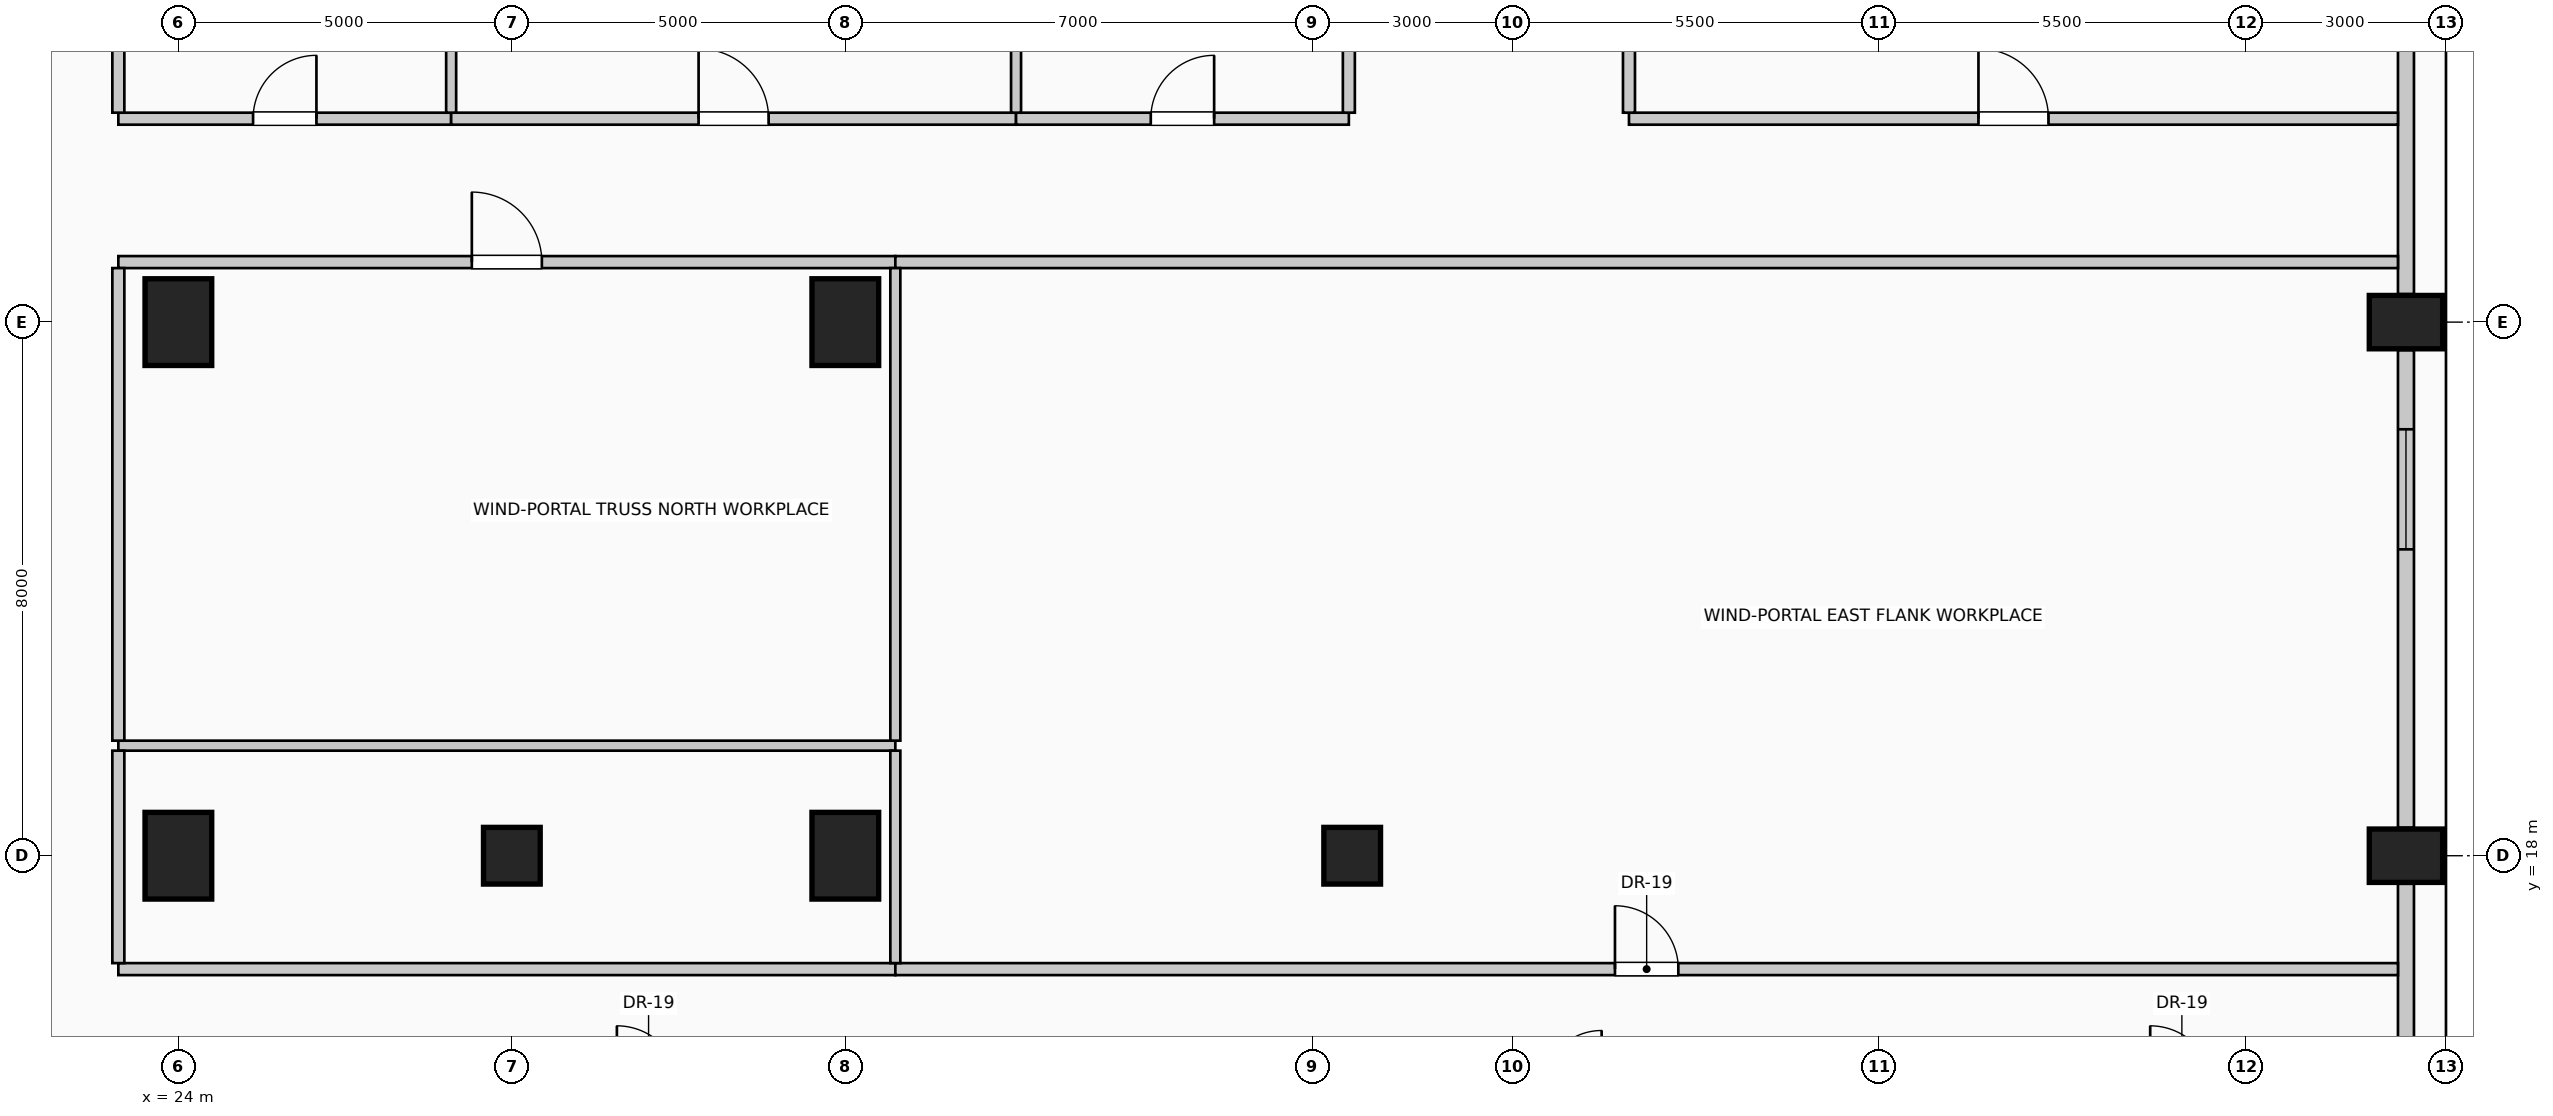
"""IFC4 building model, lengths in metres.
Left out: names, types, materials, properties, quantities, classifications, styles, units other than length and angle.
Written with IfcOpenShell. Run it as: python <this file> out.ifc"""

import sys

from ifc_helpers import new_model, si_unit, direction, frame, frame_2d, origin, origin_2d, place, context, subcontext, project, spatial, rectangle, circle, extrude, element, fill, save


model = new_model("IFC4")
c1 = context("Model", 3, precision=1e-05, world=origin(), true_north=direction((0.0, 1.0)))
c2 = subcontext(c1, "Body", "Model", "MODEL_VIEW")
j1 = project(units=[si_unit("LENGTHUNIT", "METRE"), si_unit("PLANEANGLEUNIT", "RADIAN")], contexts=[c1])
p1 = place(None, origin())
s1 = spatial("IfcSite", under=j1, at=p1, CompositionType="ELEMENT")
p2 = place(p1, origin())
s2 = spatial("IfcBuilding", under=s1, at=p2, CompositionType="ELEMENT")
p3 = place(p2, frame((0.0, 0.0, 214.6)))
s3 = spatial("IfcBuildingStorey", under=s2, at=p3, CompositionType="ELEMENT", Elevation=214.6)
for number, where, z_axis, x_axis in (
    (1, (57.4, 18.0, 0.0), (0.0, 0.0, 1.0), (0.0, 1.0, 0.0)),
    (2, (57.4, 26.0, 0.0), (0.0, 0.0, 1.0), (0.0, 1.0, 0.0)),
):
    element("IfcColumn", number, at=place(p3, frame(where, z_axis=z_axis, x_axis=x_axis)), inside=s3, PredefinedType="COLUMN", context=c2, shape_type="SweptSolid", body=[
        extrude(rectangle(XDim=0.8, YDim=1.1, at=origin_2d()), origin(), (0.0, 0.0, 1.0), 4.0),
    ])
for number, where, z_axis, x_axis in (
    (3, (24.0, 18.0, 0.0), (0.0, 0.0, 1.0), (1.0, 0.0, 0.0)),
    (4, (34.0, 18.0, 0.0), (0.0, 0.0, 1.0), (1.0, 0.0, 0.0)),
    (5, (24.0, 26.0, 0.0), (0.0, 0.0, 1.0), (1.0, 0.0, 0.0)),
    (6, (34.0, 26.0, 0.0), (0.0, 0.0, 1.0), (1.0, 0.0, 0.0)),
):
    element("IfcColumn", number, at=place(p3, frame(where, z_axis=z_axis, x_axis=x_axis)), inside=s3, PredefinedType="COLUMN", context=c2, shape_type="SweptSolid", body=[
        extrude(rectangle(XDim=1.0, YDim=1.3, at=origin_2d()), origin(), (0.0, 0.0, 1.0), 4.0),
    ])
for number, where, z_axis, x_axis in (
    (7, (29.0, 18.0, 0.0), (0.0, 0.0, 1.0), (1.0, 0.0, 0.0)),
    (8, (41.6, 18.0, 0.0), (0.0, 0.0, 1.0), (1.0, 0.0, 0.0)),
):
    element("IfcColumn", number, at=place(p3, frame(where, z_axis=z_axis, x_axis=x_axis)), inside=s3, PredefinedType="COLUMN", context=c2, shape_type="SweptSolid", body=[
        extrude(circle(Radius=0.425, at=origin_2d()), origin(), (0.0, 0.0, 1.0), 4.0),
    ])
p4 = place(p3, frame((57.4, 17.58, 0.0), z_axis=(0.0, 0.0, 1.0), x_axis=(0.0, -1.0, 0.0)))
e9 = element("IfcWall", 9, at=p4, inside=s3, PredefinedType="SOLIDWALL", context=c2, shape_type="SweptSolid", body=[
    extrude(rectangle(XDim=7.16, YDim=0.24, at=frame_2d((3.58, 0.0))), origin(), (0.0, 0.0, 1.0), 3.0),
])
p5 = place(p4, frame((4.173, 0.0, 0.42)))
e10 = element("IfcOpeningElement", 10, at=p5, cuts=e9, PredefinedType="OPENING", context=c2, shape_type="SweptSolid", body=[
    extrude(rectangle(XDim=1.8, YDim=2.2, at=frame_2d((0.9, 1.1))), frame((0.0, 0.13, 0.0), z_axis=(0.0, -1.0, 0.0), x_axis=(1.0, 0.0, 0.0)), (0.0, 0.0, 1.0), 0.26),
])
p6 = place(p3, frame((57.4, 25.58, 0.0), z_axis=(0.0, 0.0, 1.0), x_axis=(0.0, -1.0, 0.0)))
e11 = element("IfcWall", 11, at=p6, inside=s3, PredefinedType="SOLIDWALL", context=c2, shape_type="SweptSolid", body=[
    extrude(rectangle(XDim=7.16, YDim=0.24, at=frame_2d((3.58, 0.0))), origin(), (0.0, 0.0, 1.0), 3.0),
])
p7 = place(p6, frame((1.187, 0.0, 0.42)))
e12 = element("IfcOpeningElement", 12, at=p7, cuts=e11, PredefinedType="OPENING", context=c2, shape_type="SweptSolid", body=[
    extrude(rectangle(XDim=1.8, YDim=2.2, at=frame_2d((0.9, 1.1))), frame((0.0, 0.13, 0.0), z_axis=(0.0, -1.0, 0.0), x_axis=(1.0, 0.0, 0.0)), (0.0, 0.0, 1.0), 0.26),
])
p8 = place(p3, frame((57.4, 33.58, 0.0), z_axis=(0.0, 0.0, 1.0), x_axis=(0.0, -1.0, 0.0)))
e13 = element("IfcWall", 13, at=p8, inside=s3, PredefinedType="SOLIDWALL", context=c2, shape_type="SweptSolid", body=[
    extrude(rectangle(XDim=7.16, YDim=0.24, at=frame_2d((3.58, 0.0))), origin(), (0.0, 0.0, 1.0), 3.0),
])
p9 = place(p3, frame((23.1, 16.3, 0.0), z_axis=(0.0, 0.0, 1.0), x_axis=(1.0, 0.0, 0.0)))
e14 = element("IfcWall", 14, at=p9, inside=s3, PredefinedType="PARTITIONING", context=c2, shape_type="SweptSolid", body=[
    extrude(rectangle(XDim=11.65, YDim=0.18, at=frame_2d((5.825, 0.0))), origin(), (0.0, 0.0, 1.0), 3.75),
])
p10 = place(p3, frame((34.75, 16.3, 0.0), z_axis=(0.0, 0.0, 1.0), x_axis=(1.0, 0.0, 0.0)))
e15 = element("IfcWall", 15, at=p10, inside=s3, PredefinedType="PARTITIONING", context=c2, shape_type="SweptSolid", body=[
    extrude(rectangle(XDim=22.53, YDim=0.18, at=frame_2d((11.265, 0.0))), origin(), (0.0, 0.0, 1.0), 3.75),
])
p11 = place(p10, frame((10.79, 0.0, 0.0)))
e16 = element("IfcOpeningElement", 16, at=p11, cuts=e15, PredefinedType="OPENING", context=c2, shape_type="SweptSolid", body=[
    extrude(rectangle(XDim=0.95, YDim=2.15, at=frame_2d((0.475, 1.075))), frame((0.0, 0.1, 0.0), z_axis=(0.0, -1.0, 0.0), x_axis=(1.0, 0.0, 0.0)), (0.0, 0.0, 1.0), 0.2),
])
p12 = place(p3, frame((23.1, 19.65, 0.0), z_axis=(0.0, 0.0, 1.0), x_axis=(1.0, 0.0, 0.0)))
e17 = element("IfcWall", 17, at=p12, inside=s3, PredefinedType="PARTITIONING", context=c2, shape_type="SweptSolid", body=[
    extrude(rectangle(XDim=11.65, YDim=0.15, at=frame_2d((5.825, 0.0))), origin(), (0.0, 0.0, 1.0), 3.75),
])
p13 = place(p3, frame((23.1, 26.9, 0.0), z_axis=(0.0, 0.0, 1.0), x_axis=(1.0, 0.0, 0.0)))
e18 = element("IfcWall", 18, at=p13, inside=s3, PredefinedType="PARTITIONING", context=c2, shape_type="SweptSolid", body=[
    extrude(rectangle(XDim=11.65, YDim=0.18, at=frame_2d((5.825, 0.0))), origin(), (0.0, 0.0, 1.0), 3.75),
])
p14 = place(p13, frame((5.3, 0.0, 0.0)))
e19 = element("IfcOpeningElement", 19, at=p14, cuts=e18, PredefinedType="OPENING", context=c2, shape_type="SweptSolid", body=[
    extrude(rectangle(XDim=1.05, YDim=2.15, at=frame_2d((0.525, 1.075))), frame((0.0, 0.1, 0.0), z_axis=(0.0, -1.0, 0.0), x_axis=(1.0, 0.0, 0.0)), (0.0, 0.0, 1.0), 0.2),
])
p15 = place(p3, frame((34.75, 26.9, 0.0), z_axis=(0.0, 0.0, 1.0), x_axis=(1.0, 0.0, 0.0)))
e20 = element("IfcWall", 20, at=p15, inside=s3, PredefinedType="PARTITIONING", context=c2, shape_type="SweptSolid", body=[
    extrude(rectangle(XDim=22.53, YDim=0.18, at=frame_2d((11.265, 0.0))), origin(), (0.0, 0.0, 1.0), 3.75),
])
p16 = place(p3, frame((23.1, 29.05, 0.0), z_axis=(0.0, 0.0, 1.0), x_axis=(1.0, 0.0, 0.0)))
e21 = element("IfcWall", 21, at=p16, inside=s3, PredefinedType="PARTITIONING", context=c2, shape_type="SweptSolid", body=[
    extrude(rectangle(XDim=4.99, YDim=0.18, at=frame_2d((2.495, 0.0))), origin(), (0.0, 0.0, 1.0), 3.75),
])
p17 = place(p16, frame((2.02, 0.0, 0.0)))
e22 = element("IfcOpeningElement", 22, at=p17, cuts=e21, PredefinedType="OPENING", context=c2, shape_type="SweptSolid", body=[
    extrude(rectangle(XDim=0.95, YDim=2.15, at=frame_2d((0.475, 1.075))), frame((0.0, 0.1, 0.0), z_axis=(0.0, -1.0, 0.0), x_axis=(1.0, 0.0, 0.0)), (0.0, 0.0, 1.0), 0.2),
])
p18 = place(p3, frame((28.09, 29.05, 0.0), z_axis=(0.0, 0.0, 1.0), x_axis=(1.0, 0.0, 0.0)))
e23 = element("IfcWall", 23, at=p18, inside=s3, PredefinedType="PARTITIONING", context=c2, shape_type="SweptSolid", body=[
    extrude(rectangle(XDim=8.47, YDim=0.18, at=frame_2d((4.235, 0.0))), origin(), (0.0, 0.0, 1.0), 3.75),
])
p19 = place(p18, frame((3.71, 0.0, 0.0)))
e24 = element("IfcOpeningElement", 24, at=p19, cuts=e23, PredefinedType="OPENING", context=c2, shape_type="SweptSolid", body=[
    extrude(rectangle(XDim=1.05, YDim=2.15, at=frame_2d((0.525, 1.075))), frame((0.0, 0.1, 0.0), z_axis=(0.0, -1.0, 0.0), x_axis=(1.0, 0.0, 0.0)), (0.0, 0.0, 1.0), 0.2),
])
p20 = place(p3, frame((36.56, 29.05, 0.0), z_axis=(0.0, 0.0, 1.0), x_axis=(1.0, 0.0, 0.0)))
e25 = element("IfcWall", 25, at=p20, inside=s3, PredefinedType="PARTITIONING", context=c2, shape_type="SweptSolid", body=[
    extrude(rectangle(XDim=4.99, YDim=0.18, at=frame_2d((2.495, 0.0))), origin(), (0.0, 0.0, 1.0), 3.75),
])
p21 = place(p20, frame((2.02, 0.0, 0.0)))
e26 = element("IfcOpeningElement", 26, at=p21, cuts=e25, PredefinedType="OPENING", context=c2, shape_type="SweptSolid", body=[
    extrude(rectangle(XDim=0.95, YDim=2.15, at=frame_2d((0.475, 1.075))), frame((0.0, 0.1, 0.0), z_axis=(0.0, -1.0, 0.0), x_axis=(1.0, 0.0, 0.0)), (0.0, 0.0, 1.0), 0.2),
])
p22 = place(p3, frame((45.75, 29.05, 0.0), z_axis=(0.0, 0.0, 1.0), x_axis=(1.0, 0.0, 0.0)))
e27 = element("IfcWall", 27, at=p22, inside=s3, PredefinedType="PARTITIONING", context=c2, shape_type="SweptSolid", body=[
    extrude(rectangle(XDim=11.53, YDim=0.18, at=frame_2d((5.765, 0.0))), origin(), (0.0, 0.0, 1.0), 3.75),
])
p23 = place(p22, frame((5.24, 0.0, 0.0)))
e28 = element("IfcOpeningElement", 28, at=p23, cuts=e27, PredefinedType="OPENING", context=c2, shape_type="SweptSolid", body=[
    extrude(rectangle(XDim=1.05, YDim=2.15, at=frame_2d((0.525, 1.075))), frame((0.0, 0.1, 0.0), z_axis=(0.0, -1.0, 0.0), x_axis=(1.0, 0.0, 0.0)), (0.0, 0.0, 1.0), 0.2),
])
p24 = place(p3, frame((23.1, 16.39, 0.0), z_axis=(0.0, 0.0, 1.0), x_axis=(0.0, 1.0, 0.0)))
e29 = element("IfcWall", 29, at=p24, inside=s3, PredefinedType="PARTITIONING", context=c2, shape_type="SweptSolid", body=[
    extrude(rectangle(XDim=3.185, YDim=0.18, at=frame_2d((1.593, 0.0))), origin(), (0.0, 0.0, 1.0), 3.75),
])
p25 = place(p3, frame((23.1, 19.725, 0.0), z_axis=(0.0, 0.0, 1.0), x_axis=(0.0, 1.0, 0.0)))
e30 = element("IfcWall", 30, at=p25, inside=s3, PredefinedType="PARTITIONING", context=c2, shape_type="SweptSolid", body=[
    extrude(rectangle(XDim=7.085, YDim=0.18, at=frame_2d((3.542, 0.0))), origin(), (0.0, 0.0, 1.0), 3.75),
])
p26 = place(p3, frame((23.1, 29.14, 0.0), z_axis=(0.0, 0.0, 1.0), x_axis=(0.0, 1.0, 0.0)))
e31 = element("IfcWall", 31, at=p26, inside=s3, PredefinedType="PARTITIONING", context=c2, shape_type="SweptSolid", body=[
    extrude(rectangle(XDim=3.12, YDim=0.18, at=frame_2d((1.56, 0.0))), origin(), (0.0, 0.0, 1.0), 3.75),
])
p27 = place(p3, frame((28.09, 29.14, 0.0), z_axis=(0.0, 0.0, 1.0), x_axis=(0.0, 1.0, 0.0)))
e32 = element("IfcWall", 32, at=p27, inside=s3, PredefinedType="PARTITIONING", context=c2, shape_type="SweptSolid", body=[
    extrude(rectangle(XDim=16.14, YDim=0.15, at=frame_2d((8.07, 0.0))), origin(), (0.0, 0.0, 1.0), 3.75),
])
p28 = place(p3, frame((34.75, 16.39, 0.0), z_axis=(0.0, 0.0, 1.0), x_axis=(0.0, 1.0, 0.0)))
e33 = element("IfcWall", 33, at=p28, inside=s3, PredefinedType="PARTITIONING", context=c2, shape_type="SweptSolid", body=[
    extrude(rectangle(XDim=3.185, YDim=0.15, at=frame_2d((1.593, 0.0))), origin(), (0.0, 0.0, 1.0), 3.75),
])
p29 = place(p3, frame((34.75, 19.725, 0.0), z_axis=(0.0, 0.0, 1.0), x_axis=(0.0, 1.0, 0.0)))
e34 = element("IfcWall", 34, at=p29, inside=s3, PredefinedType="PARTITIONING", context=c2, shape_type="SweptSolid", body=[
    extrude(rectangle(XDim=7.085, YDim=0.15, at=frame_2d((3.542, 0.0))), origin(), (0.0, 0.0, 1.0), 3.75),
])
p30 = place(p3, frame((36.56, 29.14, 0.0), z_axis=(0.0, 0.0, 1.0), x_axis=(0.0, 1.0, 0.0)))
e35 = element("IfcWall", 35, at=p30, inside=s3, PredefinedType="PARTITIONING", context=c2, shape_type="SweptSolid", body=[
    extrude(rectangle(XDim=16.14, YDim=0.15, at=frame_2d((8.07, 0.0))), origin(), (0.0, 0.0, 1.0), 3.75),
])
p31 = place(p3, frame((41.55, 29.14, 0.0), z_axis=(0.0, 0.0, 1.0), x_axis=(0.0, 1.0, 0.0)))
e36 = element("IfcWall", 36, at=p31, inside=s3, PredefinedType="PARTITIONING", context=c2, shape_type="SweptSolid", body=[
    extrude(rectangle(XDim=3.21, YDim=0.18, at=frame_2d((1.605, 0.0))), origin(), (0.0, 0.0, 1.0), 3.145),
])
p32 = place(p3, frame((45.75, 29.14, 0.0), z_axis=(0.0, 0.0, 1.0), x_axis=(0.0, 1.0, 0.0)))
e37 = element("IfcWall", 37, at=p32, inside=s3, PredefinedType="PARTITIONING", context=c2, shape_type="SweptSolid", body=[
    extrude(rectangle(XDim=3.135, YDim=0.18, at=frame_2d((1.567, 0.0))), origin(), (0.0, 0.0, 1.0), 3.75),
])
p33 = place(p7, origin())
e38 = element("IfcWindow", 38, at=p33, inside=s3, PartitioningType="SINGLE_PANEL", PredefinedType="WINDOW", context=c2, shape_type="SweptSolid", body=[
    extrude(rectangle(XDim=1.8, YDim=2.2, at=frame_2d((0.9, 1.1))), frame((0.0, 0.03, 0.0), z_axis=(0.0, -1.0, 0.0), x_axis=(1.0, 0.0, 0.0)), (0.0, 0.0, 1.0), 0.06),
])
fill(e12, e38)
p34 = place(p11, origin())
e39 = element("IfcDoor", 39, at=p34, inside=s3, OperationType="SINGLE_SWING_LEFT", PredefinedType="DOOR", context=c2, shape_type="SweptSolid", body=[
    extrude(rectangle(XDim=0.95, YDim=2.15, at=frame_2d((0.475, 1.075))), frame((0.0, 0.025, 0.0), z_axis=(0.0, -1.0, 0.0), x_axis=(1.0, 0.0, 0.0)), (0.0, 0.0, 1.0), 0.05),
])
fill(e16, e39)
p35 = place(p14, origin())
e40 = element("IfcDoor", 40, at=p35, inside=s3, OperationType="SINGLE_SWING_LEFT", PredefinedType="DOOR", context=c2, shape_type="SweptSolid", body=[
    extrude(rectangle(XDim=1.05, YDim=2.15, at=frame_2d((0.525, 1.075))), frame((0.0, 0.025, 0.0), z_axis=(0.0, -1.0, 0.0), x_axis=(1.0, 0.0, 0.0)), (0.0, 0.0, 1.0), 0.05),
])
fill(e19, e40)
p36 = place(p17, origin())
e41 = element("IfcDoor", 41, at=p36, inside=s3, OperationType="SINGLE_SWING_RIGHT", PredefinedType="DOOR", context=c2, shape_type="SweptSolid", body=[
    extrude(rectangle(XDim=0.95, YDim=2.15, at=frame_2d((0.475, 1.075))), frame((0.0, 0.025, 0.0), z_axis=(0.0, -1.0, 0.0), x_axis=(1.0, 0.0, 0.0)), (0.0, 0.0, 1.0), 0.05),
])
fill(e22, e41)
p37 = place(p19, origin())
e42 = element("IfcDoor", 42, at=p37, inside=s3, OperationType="SINGLE_SWING_LEFT", PredefinedType="DOOR", context=c2, shape_type="SweptSolid", body=[
    extrude(rectangle(XDim=1.05, YDim=2.15, at=frame_2d((0.525, 1.075))), frame((0.0, 0.025, 0.0), z_axis=(0.0, -1.0, 0.0), x_axis=(1.0, 0.0, 0.0)), (0.0, 0.0, 1.0), 0.05),
])
fill(e24, e42)
p38 = place(p21, origin())
e43 = element("IfcDoor", 43, at=p38, inside=s3, OperationType="SINGLE_SWING_RIGHT", PredefinedType="DOOR", context=c2, shape_type="SweptSolid", body=[
    extrude(rectangle(XDim=0.95, YDim=2.15, at=frame_2d((0.475, 1.075))), frame((0.0, 0.025, 0.0), z_axis=(0.0, -1.0, 0.0), x_axis=(1.0, 0.0, 0.0)), (0.0, 0.0, 1.0), 0.05),
])
fill(e26, e43)
p39 = place(p23, origin())
e44 = element("IfcDoor", 44, at=p39, inside=s3, OperationType="SINGLE_SWING_LEFT", PredefinedType="DOOR", context=c2, shape_type="SweptSolid", body=[
    extrude(rectangle(XDim=1.05, YDim=2.15, at=frame_2d((0.525, 1.075))), frame((0.0, 0.025, 0.0), z_axis=(0.0, -1.0, 0.0), x_axis=(1.0, 0.0, 0.0)), (0.0, 0.0, 1.0), 0.05),
])
fill(e28, e44)
save(model, sys.argv[1])
